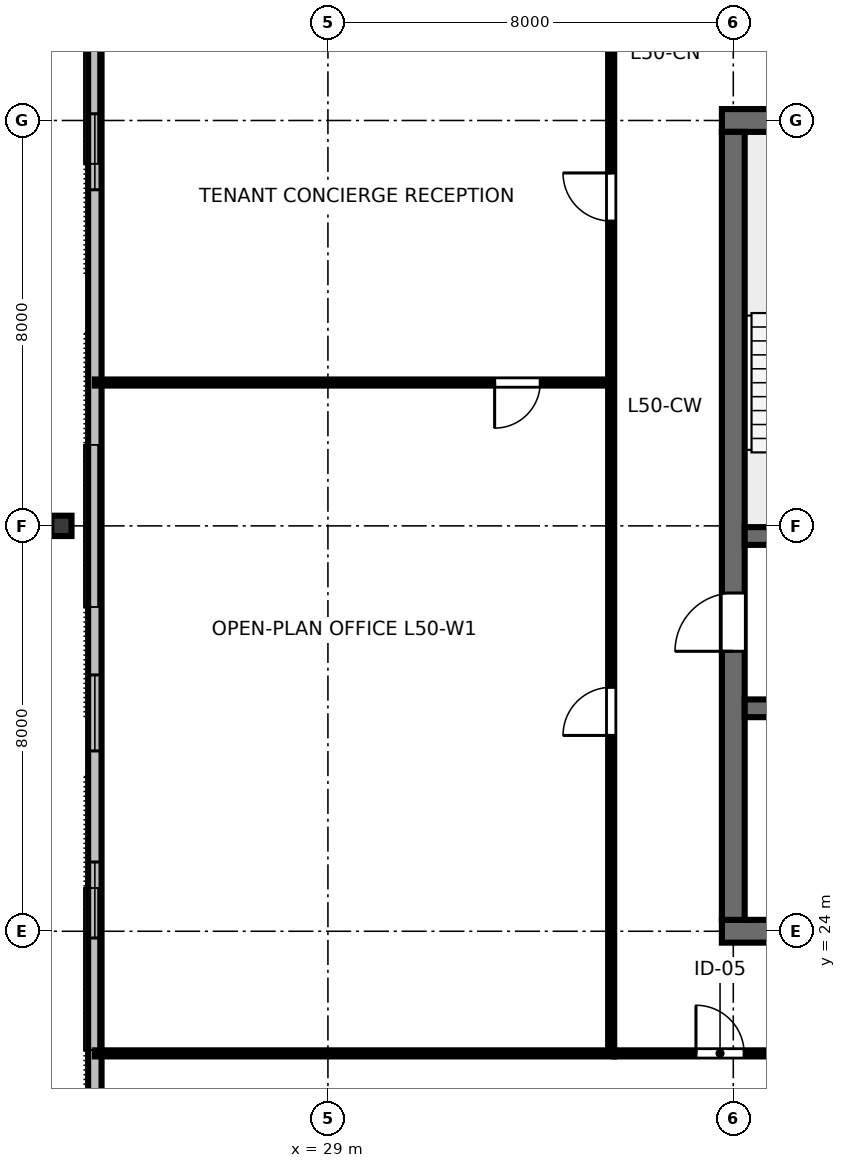
"""IFC4 building model, lengths in metres.
Left out: names, types, materials, properties, quantities, classifications, styles, units other than length and angle.
Written with IfcOpenShell. Run it as: python <this file> out.ifc"""

import sys

from ifc_helpers import new_model, si_unit, direction, frame, frame_2d, origin, origin_2d, place, context, subcontext, project, spatial, rectangle, i_section, extrude, element, fill, save


model = new_model("IFC4")
c1 = context("Model", 3, precision=1e-05, world=origin(), true_north=direction((0.0, 1.0)))
c2 = subcontext(c1, "Body", "Model", "MODEL_VIEW")
j1 = project(units=[si_unit("LENGTHUNIT", "METRE"), si_unit("PLANEANGLEUNIT", "RADIAN")], contexts=[c1])
p1 = place(None, origin())
s1 = spatial("IfcSite", under=j1, at=p1, CompositionType="ELEMENT")
p2 = place(p1, origin())
s2 = spatial("IfcBuilding", under=s1, at=p2, CompositionType="ELEMENT")
p3 = place(p2, frame((0.0, 0.0, 191.4)))
s3 = spatial("IfcBuildingStorey", under=s2, at=p3, CompositionType="ELEMENT", Elevation=191.4)
p4 = place(p3, frame((36.775, 24.0, 0.0), z_axis=(0.0, 0.0, 1.0), x_axis=(1.0, 0.0, 0.0)))
e1 = element("IfcWall", 1, at=p4, inside=s3, PredefinedType="SHEAR", context=c2, shape_type="SweptSolid", body=[
    extrude(rectangle(XDim=18.45, YDim=0.45, at=frame_2d((9.225, 0.0))), origin(), (0.0, 0.0, 1.0), 3.36),
])
p5 = place(p4, frame((13.425, 0.0, 0.0)))
e2 = element("IfcOpeningElement", 2, at=p5, cuts=e1, PredefinedType="OPENING", context=c2, shape_type="SweptSolid", body=[
    extrude(rectangle(XDim=1.6, YDim=2.15, at=frame_2d((0.8, 1.075))), frame((0.0, 0.235, 0.0), z_axis=(0.0, -1.0, 0.0), x_axis=(1.0, 0.0, 0.0)), (0.0, 0.0, 1.0), 0.47),
])
p6 = place(p3, frame((36.775, 40.0, 0.0), z_axis=(0.0, 0.0, 1.0), x_axis=(1.0, 0.0, 0.0)))
e3 = element("IfcWall", 3, at=p6, inside=s3, PredefinedType="SHEAR", context=c2, shape_type="SweptSolid", body=[
    extrude(rectangle(XDim=18.45, YDim=0.45, at=frame_2d((9.225, 0.0))), origin(), (0.0, 0.0, 1.0), 3.36),
])
p7 = place(p6, frame((8.725, 0.0, 0.0)))
e4 = element("IfcOpeningElement", 4, at=p7, cuts=e3, PredefinedType="OPENING", context=c2, shape_type="SweptSolid", body=[
    extrude(rectangle(XDim=1.0, YDim=2.15, at=frame_2d((0.5, 1.075))), frame((0.0, 0.235, 0.0), z_axis=(0.0, -1.0, 0.0), x_axis=(1.0, 0.0, 0.0)), (0.0, 0.0, 1.0), 0.47),
])
p8 = place(p3, frame((37.0, 24.225, 0.0), z_axis=(0.0, 0.0, 1.0), x_axis=(0.0, 1.0, 0.0)))
e5 = element("IfcWall", 5, at=p8, inside=s3, PredefinedType="SHEAR", context=c2, shape_type="SweptSolid", body=[
    extrude(rectangle(XDim=15.55, YDim=0.45, at=frame_2d((7.775, 0.0))), origin(), (0.0, 0.0, 1.0), 3.36),
])
p9 = place(p8, frame((5.3, 0.0, 0.0)))
e6 = element("IfcOpeningElement", 6, at=p9, cuts=e5, PredefinedType="OPENING", context=c2, shape_type="SweptSolid", body=[
    extrude(rectangle(XDim=1.15, YDim=2.15, at=frame_2d((0.575, 1.075))), frame((0.0, 0.235, 0.0), z_axis=(0.0, -1.0, 0.0), x_axis=(1.0, 0.0, 0.0)), (0.0, 0.0, 1.0), 0.47),
])
p10 = place(p3, frame((37.225, 31.8, 0.0), z_axis=(0.0, 0.0, 1.0), x_axis=(1.0, 0.0, 0.0)))
e7 = element("IfcWall", 7, at=p10, inside=s3, PredefinedType="SHEAR", context=c2, shape_type="SweptSolid", body=[
    extrude(rectangle(XDim=17.55, YDim=0.35, at=frame_2d((8.775, 0.0))), origin(), (0.0, 0.0, 1.0), 3.36),
])
p11 = place(p10, frame((0.825, 0.0, 0.0)))
e8 = element("IfcOpeningElement", 8, at=p11, cuts=e7, PredefinedType="OPENING", context=c2, shape_type="SweptSolid", body=[
    extrude(rectangle(XDim=1.1, YDim=2.15, at=frame_2d((0.55, 1.075))), frame((0.0, 0.185, 0.0), z_axis=(0.0, -1.0, 0.0), x_axis=(1.0, 0.0, 0.0)), (0.0, 0.0, 1.0), 0.37),
])
p12 = place(p10, frame((14.725, 0.0, 0.0)))
e9 = element("IfcOpeningElement", 9, at=p12, cuts=e7, PredefinedType="OPENING", context=c2, shape_type="SweptSolid", body=[
    extrude(rectangle(XDim=1.1, YDim=2.15, at=frame_2d((0.55, 1.075))), frame((0.0, 0.185, 0.0), z_axis=(0.0, -1.0, 0.0), x_axis=(1.0, 0.0, 0.0)), (0.0, 0.0, 1.0), 0.37),
])
p13 = place(p3, frame((37.225, 28.4, 0.0), z_axis=(0.0, 0.0, 1.0), x_axis=(1.0, 0.0, 0.0)))
e10 = element("IfcWall", 10, at=p13, inside=s3, PredefinedType="SHEAR", context=c2, shape_type="SweptSolid", body=[
    extrude(rectangle(XDim=17.55, YDim=0.35, at=frame_2d((8.775, 0.0))), origin(), (0.0, 0.0, 1.0), 3.36),
])
p14 = place(p3, frame((23.74, 32.0, 0.0), z_axis=(0.0, 0.0, 1.0), x_axis=(0.0, 1.0, 0.0)))
e11 = element("IfcColumn", 11, at=p14, inside=s3, PredefinedType="COLUMN", context=c2, shape_type="SweptSolid", body=[
    extrude(i_section(OverallWidth=0.401, OverallDepth=0.399, WebThickness=0.025, FlangeThickness=0.04, FilletRadius=0.025, at=origin_2d()), origin(), (0.0, 0.0, 1.0), 3.373),
])
p15 = place(p3, frame((24.4, 46.02, 0.0), z_axis=(0.0, 0.0, 1.0), x_axis=(0.0, -1.0, 0.0)))
e12 = element("IfcWall", 12, at=p15, inside=s3, PredefinedType="STANDARD", context=c2, shape_type="SweptSolid", body=[
    extrude(rectangle(XDim=28.04, YDim=0.265, at=frame_2d((14.02, 0.0))), origin(), (0.0, 0.0, 1.0), 3.375),
])
p16 = place(p15, frame((5.887, 0.0, 0.85)))
e13 = element("IfcOpeningElement", 13, at=p16, cuts=e12, PredefinedType="OPENING", context=c2, shape_type="SweptSolid", body=[
    extrude(rectangle(XDim=1.5, YDim=1.85, at=frame_2d((0.75, 0.925))), frame((0.0, 0.142, 0.0), z_axis=(0.0, -1.0, 0.0), x_axis=(1.0, 0.0, 0.0)), (0.0, 0.0, 1.0), 0.285),
])
p17 = place(p15, frame((16.961, 0.0, 0.85)))
e14 = element("IfcOpeningElement", 14, at=p17, cuts=e12, PredefinedType="OPENING", context=c2, shape_type="SweptSolid", body=[
    extrude(rectangle(XDim=1.5, YDim=1.85, at=frame_2d((0.75, 0.925))), frame((0.0, 0.142, 0.0), z_axis=(0.0, -1.0, 0.0), x_axis=(1.0, 0.0, 0.0)), (0.0, 0.0, 1.0), 0.285),
])
p18 = place(p15, frame((20.653, 0.0, 0.85)))
e15 = element("IfcOpeningElement", 15, at=p18, cuts=e12, PredefinedType="OPENING", context=c2, shape_type="SweptSolid", body=[
    extrude(rectangle(XDim=1.5, YDim=1.85, at=frame_2d((0.75, 0.925))), frame((0.0, 0.142, 0.0), z_axis=(0.0, -1.0, 0.0), x_axis=(1.0, 0.0, 0.0)), (0.0, 0.0, 1.0), 0.285),
])
p19 = place(p3, frame((34.65, 21.59, 0.0), z_axis=(0.0, 0.0, 1.0), x_axis=(1.0, 0.0, 0.0)))
e16 = element("IfcWall", 16, at=p19, inside=s3, PredefinedType="PARTITIONING", context=c2, shape_type="SweptSolid", body=[
    extrude(rectangle(XDim=10.33, YDim=0.12, at=frame_2d((5.165, 0.0))), origin(), (0.0, 0.0, 1.0), 2.655),
])
p20 = place(p19, frame((1.614, 0.0, 0.0)))
e17 = element("IfcOpeningElement", 17, at=p20, cuts=e16, PredefinedType="OPENING", context=c2, shape_type="SweptSolid", body=[
    extrude(rectangle(XDim=0.95, YDim=2.15, at=frame_2d((0.475, 1.075))), frame((0.0, 0.07, 0.0), z_axis=(0.0, -1.0, 0.0), x_axis=(1.0, 0.0, 0.0)), (0.0, 0.0, 1.0), 0.14),
])
p21 = place(p19, frame((6.306, 0.0, 0.0)))
e18 = element("IfcOpeningElement", 18, at=p21, cuts=e16, PredefinedType="OPENING", context=c2, shape_type="SweptSolid", body=[
    extrude(rectangle(XDim=0.95, YDim=2.15, at=frame_2d((0.475, 1.075))), frame((0.0, 0.07, 0.0), z_axis=(0.0, -1.0, 0.0), x_axis=(1.0, 0.0, 0.0)), (0.0, 0.0, 1.0), 0.14),
])
p22 = place(p3, frame((34.59, 34.829, 0.0), z_axis=(0.0, 0.0, 1.0), x_axis=(-1.0, 0.0, 0.0)))
e19 = element("IfcWall", 19, at=p22, inside=s3, PredefinedType="PARTITIONING", context=c2, shape_type="SweptSolid", body=[
    extrude(rectangle(XDim=10.19, YDim=0.12, at=frame_2d((5.095, 0.0))), origin(), (0.0, 0.0, 1.0), 2.655),
])
p23 = place(p22, frame((1.4, 0.0, 0.0)))
e20 = element("IfcOpeningElement", 20, at=p23, cuts=e19, PredefinedType="OPENING", context=c2, shape_type="SweptSolid", body=[
    extrude(rectangle(XDim=0.9, YDim=2.15, at=frame_2d((0.45, 1.075))), frame((0.0, 0.07, 0.0), z_axis=(0.0, -1.0, 0.0), x_axis=(1.0, 0.0, 0.0)), (0.0, 0.0, 1.0), 0.14),
])
p24 = place(p3, frame((34.59, 21.65, 0.0), z_axis=(0.0, 0.0, 1.0), x_axis=(0.0, 1.0, 0.0)))
e21 = element("IfcWall", 21, at=p24, inside=s3, PredefinedType="PARTITIONING", context=c2, shape_type="SweptSolid", body=[
    extrude(rectangle(XDim=20.7, YDim=0.12, at=frame_2d((10.35, 0.0))), origin(), (0.0, 0.0, 1.0), 2.655),
])
p25 = place(p24, frame((6.214, 0.0, 0.0)))
e22 = element("IfcOpeningElement", 22, at=p25, cuts=e21, PredefinedType="OPENING", context=c2, shape_type="SweptSolid", body=[
    extrude(rectangle(XDim=0.95, YDim=2.15, at=frame_2d((0.475, 1.075))), frame((0.0, 0.07, 0.0), z_axis=(0.0, -1.0, 0.0), x_axis=(1.0, 0.0, 0.0)), (0.0, 0.0, 1.0), 0.14),
])
p26 = place(p24, frame((16.365, 0.0, 0.0)))
e23 = element("IfcOpeningElement", 23, at=p26, cuts=e21, PredefinedType="OPENING", context=c2, shape_type="SweptSolid", body=[
    extrude(rectangle(XDim=0.95, YDim=2.15, at=frame_2d((0.475, 1.075))), frame((0.0, 0.07, 0.0), z_axis=(0.0, -1.0, 0.0), x_axis=(1.0, 0.0, 0.0)), (0.0, 0.0, 1.0), 0.14),
])
p27 = place(p3, frame((34.65, 21.59, 0.0), z_axis=(0.0, 0.0, 1.0), x_axis=(-1.0, 0.0, 0.0)))
e24 = element("IfcWall", 24, at=p27, inside=s3, PredefinedType="PARTITIONING", context=c2, shape_type="SweptSolid", body=[
    extrude(rectangle(XDim=10.25, YDim=0.12, at=frame_2d((5.125, 0.0))), origin(), (0.0, 0.0, 1.0), 2.655),
])
p28 = place(p16, origin())
e25 = element("IfcWindow", 25, at=p28, inside=s3, PartitioningType="SINGLE_PANEL", PredefinedType="WINDOW", context=c2, shape_type="SweptSolid", body=[
    extrude(rectangle(XDim=1.5, YDim=1.85, at=frame_2d((0.75, 0.925))), frame((0.0, 0.03, 0.0), z_axis=(0.0, -1.0, 0.0), x_axis=(1.0, 0.0, 0.0)), (0.0, 0.0, 1.0), 0.06),
])
fill(e13, e25)
p29 = place(p17, origin())
e26 = element("IfcWindow", 26, at=p29, inside=s3, PartitioningType="SINGLE_PANEL", PredefinedType="WINDOW", context=c2, shape_type="SweptSolid", body=[
    extrude(rectangle(XDim=1.5, YDim=1.85, at=frame_2d((0.75, 0.925))), frame((0.0, 0.03, 0.0), z_axis=(0.0, -1.0, 0.0), x_axis=(1.0, 0.0, 0.0)), (0.0, 0.0, 1.0), 0.06),
])
fill(e14, e26)
p30 = place(p18, origin())
e27 = element("IfcWindow", 27, at=p30, inside=s3, PartitioningType="SINGLE_PANEL", PredefinedType="WINDOW", context=c2, shape_type="SweptSolid", body=[
    extrude(rectangle(XDim=1.5, YDim=1.85, at=frame_2d((0.75, 0.925))), frame((0.0, 0.03, 0.0), z_axis=(0.0, -1.0, 0.0), x_axis=(1.0, 0.0, 0.0)), (0.0, 0.0, 1.0), 0.06),
])
fill(e15, e27)
p31 = place(p9, origin())
e28 = element("IfcDoor", 28, at=p31, inside=s3, OperationType="SINGLE_SWING_LEFT", PredefinedType="DOOR", context=c2, shape_type="SweptSolid", body=[
    extrude(rectangle(XDim=1.15, YDim=2.15, at=frame_2d((0.575, 1.075))), frame((0.0, 0.025, 0.0), z_axis=(0.0, -1.0, 0.0), x_axis=(1.0, 0.0, 0.0)), (0.0, 0.0, 1.0), 0.05),
])
fill(e6, e28)
p32 = place(p20, origin())
e29 = element("IfcDoor", 29, at=p32, inside=s3, OperationType="SINGLE_SWING_LEFT", PredefinedType="DOOR", context=c2, shape_type="SweptSolid", body=[
    extrude(rectangle(XDim=0.95, YDim=2.15, at=frame_2d((0.475, 1.075))), frame((0.0, 0.025, 0.0), z_axis=(0.0, -1.0, 0.0), x_axis=(1.0, 0.0, 0.0)), (0.0, 0.0, 1.0), 0.05),
])
fill(e17, e29)
p33 = place(p23, origin())
e30 = element("IfcDoor", 30, at=p33, inside=s3, OperationType="SINGLE_SWING_RIGHT", PredefinedType="DOOR", context=c2, shape_type="SweptSolid", body=[
    extrude(rectangle(XDim=0.9, YDim=2.15, at=frame_2d((0.45, 1.075))), frame((0.0, 0.025, 0.0), z_axis=(0.0, -1.0, 0.0), x_axis=(1.0, 0.0, 0.0)), (0.0, 0.0, 1.0), 0.05),
])
fill(e20, e30)
p34 = place(p25, origin())
e31 = element("IfcDoor", 31, at=p34, inside=s3, OperationType="SINGLE_SWING_LEFT", PredefinedType="DOOR", context=c2, shape_type="SweptSolid", body=[
    extrude(rectangle(XDim=0.95, YDim=2.15, at=frame_2d((0.475, 1.075))), frame((0.0, 0.025, 0.0), z_axis=(0.0, -1.0, 0.0), x_axis=(1.0, 0.0, 0.0)), (0.0, 0.0, 1.0), 0.05),
])
fill(e22, e31)
p35 = place(p26, origin())
e32 = element("IfcDoor", 32, at=p35, inside=s3, OperationType="SINGLE_SWING_RIGHT", PredefinedType="DOOR", context=c2, shape_type="SweptSolid", body=[
    extrude(rectangle(XDim=0.95, YDim=2.15, at=frame_2d((0.475, 1.075))), frame((0.0, 0.025, 0.0), z_axis=(0.0, -1.0, 0.0), x_axis=(1.0, 0.0, 0.0)), (0.0, 0.0, 1.0), 0.05),
])
fill(e23, e32)
save(model, sys.argv[1])
